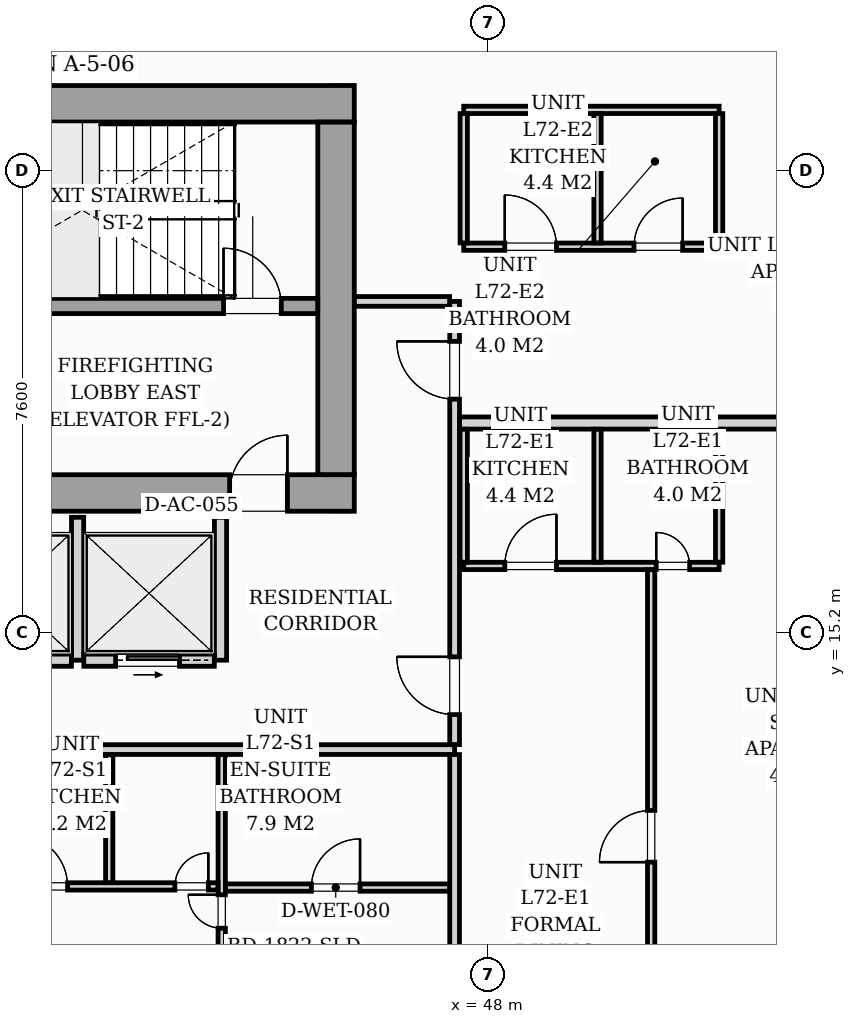
"""IFC4 building model, lengths in metres.
Left out: names, types, materials, properties, quantities, classifications, styles, units other than length and angle.
Written with IfcOpenShell. Run it as: python <this file> out.ifc"""

import sys

from ifc_helpers import new_model, si_unit, direction, frame, frame_2d, origin, origin_2d, place, context, subcontext, project, spatial, rectangle, i_section, extrude, source, transform, mapped, element, fill, save


model = new_model("IFC4")
c1 = context("Model", 3, precision=1e-05, world=origin(), true_north=direction((0.0, 1.0)))
c2 = subcontext(c1, "Body", "Model", "MODEL_VIEW")
j1 = project(units=[si_unit("LENGTHUNIT", "METRE"), si_unit("PLANEANGLEUNIT", "RADIAN")], contexts=[c1])
p1 = place(None, origin())
s1 = spatial("IfcSite", under=j1, at=p1, CompositionType="ELEMENT")
p2 = place(p1, origin())
s2 = spatial("IfcBuilding", under=s1, at=p2, CompositionType="ELEMENT")
p3 = place(p2, frame((0.0, 0.0, 249.6)))
s3 = spatial("IfcBuildingStorey", under=s2, at=p3, CompositionType="ELEMENT", Elevation=249.6)
m1 = source(origin(), c2, "Body", "SweptSolid", [
    extrude(i_section(OverallWidth=0.409, OverallDepth=0.425, WebThickness=0.033, FlangeThickness=0.052, FilletRadius=0.018, at=origin_2d()), origin(), (0.0, 0.0, 1.0), 3.296),
])
for number, where, z_axis, x_axis in (
    (1, (45.6, 17.4, 0.002), (0.0, 0.0, 1.0), (1.0, 0.0, 0.0)),
    (2, (45.6, 24.0, 0.002), (0.0, 0.0, 1.0), (1.0, 0.0, 0.0)),
):
    element("IfcColumn", number, at=place(p3, frame(where, z_axis=z_axis, x_axis=x_axis)), inside=s3, PredefinedType="PILASTER", context=c2, shape_type="MappedRepresentation", body=[
        mapped(m1, transform((0.0, 0.0, 0.0), scale=1.0)),
    ])
p4 = place(p3, frame((39.839, 26.166, 0.0), z_axis=(0.0, 0.0, 1.0), x_axis=(0.995884447498, -0.090632043071, 0.0)))
e3 = element("IfcWall", 3, at=p4, inside=s3, PredefinedType="STANDARD", context=c2, shape_type="SweptSolid", body=[
    extrude(rectangle(XDim=14.63, YDim=0.26, at=frame_2d((7.315, 0.0))), origin(), (0.0, 0.0, 1.0), 3.04),
])
p5 = place(p4, frame((7.57, 0.0, 0.0)))
e4 = element("IfcOpeningElement", 4, at=p5, cuts=e3, PredefinedType="OPENING", context=c2, shape_type="SweptSolid", body=[
    extrude(rectangle(XDim=1.8, YDim=2.06, at=frame_2d((0.9, 1.03))), frame((0.0, 0.14, 0.0), z_axis=(0.0, -1.0, 0.0), x_axis=(1.0, 0.0, 0.0)), (0.0, 0.0, 1.0), 0.28),
])
p6 = place(p4, frame((0.7, 0.0, 0.65)))
e5 = element("IfcOpeningElement", 5, at=p6, cuts=e3, PredefinedType="OPENING", context=c2, shape_type="SweptSolid", body=[
    extrude(rectangle(XDim=1.6, YDim=1.5, at=frame_2d((0.8, 0.75))), frame((0.0, 0.14, 0.0), z_axis=(0.0, -1.0, 0.0), x_axis=(1.0, 0.0, 0.0)), (0.0, 0.0, 1.0), 0.28),
])
p7 = place(p3, frame((26.2, 17.5, 0.0), z_axis=(0.0, 0.0, 1.0), x_axis=(1.0, 0.0, 0.0)))
e6 = element("IfcWall", 6, at=p7, inside=s3, PredefinedType="SHEAR", context=c2, shape_type="SweptSolid", body=[
    extrude(rectangle(XDim=19.6, YDim=0.6, at=frame_2d((9.8, 0.0))), origin(), (0.0, 0.0, 1.0), 3.3),
])
p8 = place(p7, frame((0.95, 0.0, 0.0)))
e7 = element("IfcOpeningElement", 7, at=p8, cuts=e6, PredefinedType="OPENING", context=c2, shape_type="SweptSolid", body=[
    extrude(rectangle(XDim=0.95, YDim=2.06, at=frame_2d((0.475, 1.03))), frame((0.0, 0.31, 0.0), z_axis=(0.0, -1.0, 0.0), x_axis=(1.0, 0.0, 0.0)), (0.0, 0.0, 1.0), 0.62),
])
p9 = place(p7, frame((9.38, 0.0, 0.0)))
e8 = element("IfcOpeningElement", 8, at=p9, cuts=e6, PredefinedType="OPENING", context=c2, shape_type="SweptSolid", body=[
    extrude(rectangle(XDim=0.85, YDim=2.0, at=frame_2d((0.425, 1.0))), frame((0.0, 0.31, 0.0), z_axis=(0.0, -1.0, 0.0), x_axis=(1.0, 0.0, 0.0)), (0.0, 0.0, 1.0), 0.62),
])
p10 = place(p7, frame((17.55, 0.0, 0.0)))
e9 = element("IfcOpeningElement", 9, at=p10, cuts=e6, PredefinedType="OPENING", context=c2, shape_type="SweptSolid", body=[
    extrude(rectangle(XDim=0.95, YDim=2.06, at=frame_2d((0.475, 1.03))), frame((0.0, 0.31, 0.0), z_axis=(0.0, -1.0, 0.0), x_axis=(1.0, 0.0, 0.0)), (0.0, 0.0, 1.0), 0.62),
])
p11 = place(p3, frame((26.2, 23.9, 0.0), z_axis=(0.0, 0.0, 1.0), x_axis=(1.0, 0.0, 0.0)))
e10 = element("IfcWall", 10, at=p11, inside=s3, PredefinedType="SHEAR", context=c2, shape_type="SweptSolid", body=[
    extrude(rectangle(XDim=19.6, YDim=0.6, at=frame_2d((9.8, 0.0))), origin(), (0.0, 0.0, 1.0), 3.3),
])
p12 = place(p3, frame((45.5, 17.802, 0.0), z_axis=(0.0, 0.0, 1.0), x_axis=(0.0, 1.0, 0.0)))
e11 = element("IfcWall", 11, at=p12, inside=s3, PredefinedType="SHEAR", context=c2, shape_type="SweptSolid", body=[
    extrude(rectangle(XDim=5.796, YDim=0.6, at=frame_2d((2.898, 0.0))), origin(), (0.0, 0.0, 1.0), 3.3),
])
p13 = place(p3, frame((37.05, 20.575, 0.0), z_axis=(0.0, 0.0, 1.0), x_axis=(1.0, 0.0, 0.0)))
e12 = element("IfcWall", 12, at=p13, inside=s3, PredefinedType="SOLIDWALL", context=c2, shape_type="SweptSolid", body=[
    extrude(rectangle(XDim=8.148, YDim=0.25, at=frame_2d((4.074, 0.0))), origin(), (0.0, 0.0, 1.0), 3.3),
])
p14 = place(p13, frame((6.6, 0.0, 0.0)))
e13 = element("IfcOpeningElement", 13, at=p14, cuts=e12, PredefinedType="OPENING", context=c2, shape_type="SweptSolid", body=[
    extrude(rectangle(XDim=0.95, YDim=2.06, at=frame_2d((0.475, 1.03))), frame((0.0, 0.135, 0.0), z_axis=(0.0, -1.0, 0.0), x_axis=(1.0, 0.0, 0.0)), (0.0, 0.0, 1.0), 0.27),
])
for number, where, z_axis, x_axis in (
    (14, (41.25, 14.75, 0.0), (0.0, 0.0, 1.0), (0.0, 1.0, 0.0)),
    (15, (43.6, 14.75, 0.0), (0.0, 0.0, 1.0), (0.0, 1.0, 0.0)),
):
    element("IfcWall", number, at=place(p3, frame(where, z_axis=z_axis, x_axis=x_axis)), inside=s3, PredefinedType="PARTITIONING", context=c2, shape_type="SweptSolid", body=[
        extrude(rectangle(XDim=2.35, YDim=0.2, at=frame_2d((1.175, 0.0))), origin(), (0.0, 0.0, 1.0), 3.04),
    ])
p15 = place(p3, frame((39.002, 14.75, 0.0), z_axis=(0.0, 0.0, 1.0), x_axis=(1.0, 0.0, 0.0)))
e16 = element("IfcWall", 16, at=p15, inside=s3, PredefinedType="PARTITIONING", context=c2, shape_type="SweptSolid", body=[
    extrude(rectangle(XDim=2.146, YDim=0.2, at=frame_2d((1.073, 0.0))), origin(), (0.0, 0.0, 1.0), 3.04),
])
p16 = place(p15, frame((0.523, 0.0, 0.0)))
e17 = element("IfcOpeningElement", 17, at=p16, cuts=e16, PredefinedType="OPENING", context=c2, shape_type="SweptSolid", body=[
    extrude(rectangle(XDim=1.05, YDim=2.08, at=frame_2d((0.525, 1.04))), frame((0.0, 0.11, 0.0), z_axis=(0.0, -1.0, 0.0), x_axis=(1.0, 0.0, 0.0)), (0.0, 0.0, 1.0), 0.22),
])
p17 = place(p3, frame((41.352, 14.75, 0.0), z_axis=(0.0, 0.0, 1.0), x_axis=(1.0, 0.0, 0.0)))
e18 = element("IfcWall", 18, at=p17, inside=s3, PredefinedType="PARTITIONING", context=c2, shape_type="SweptSolid", body=[
    extrude(rectangle(XDim=2.146, YDim=0.2, at=frame_2d((1.073, 0.0))), origin(), (0.0, 0.0, 1.0), 3.04),
])
p18 = place(p17, frame((0.523, 0.0, 0.0)))
e19 = element("IfcOpeningElement", 19, at=p18, cuts=e18, PredefinedType="OPENING", context=c2, shape_type="SweptSolid", body=[
    extrude(rectangle(XDim=1.05, YDim=2.08, at=frame_2d((0.525, 1.04))), frame((0.0, 0.11, 0.0), z_axis=(0.0, -1.0, 0.0), x_axis=(1.0, 0.0, 0.0)), (0.0, 0.0, 1.0), 0.22),
])
p19 = place(p3, frame((24.55, 13.28, 0.0), z_axis=(0.0, 0.0, 1.0), x_axis=(1.0, 0.0, 0.0)))
e20 = element("IfcWall", 20, at=p19, inside=s3, PredefinedType="PARTITIONING", context=c2, shape_type="SweptSolid", body=[
    extrude(rectangle(XDim=22.9, YDim=0.16, at=frame_2d((11.45, 0.0))), origin(), (0.0, 0.0, 1.0), 2.596),
])
p20 = place(p19, frame((7.125, 0.0, 0.0)))
e21 = element("IfcOpeningElement", 21, at=p20, cuts=e20, PredefinedType="OPENING", context=c2, shape_type="SweptSolid", body=[
    extrude(rectangle(XDim=0.95, YDim=2.06, at=frame_2d((0.475, 1.03))), frame((0.0, 0.09, 0.0), z_axis=(0.0, -1.0, 0.0), x_axis=(1.0, 0.0, 0.0)), (0.0, 0.0, 1.0), 0.18),
])
p21 = place(p3, frame((47.45, 7.993, 0.0), z_axis=(0.0, 0.0, 1.0), x_axis=(0.0, 1.0, 0.0)))
e22 = element("IfcWall", 22, at=p21, inside=s3, PredefinedType="PARTITIONING", context=c2, shape_type="SweptSolid", body=[
    extrude(rectangle(XDim=5.205, YDim=0.16, at=frame_2d((2.603, 0.0))), origin(), (0.0, 0.0, 1.0), 3.04),
])
p22 = place(p3, frame((47.45, 13.362, 0.0), z_axis=(0.0, 0.0, 1.0), x_axis=(0.0, 1.0, 0.0)))
e23 = element("IfcWall", 23, at=p22, inside=s3, PredefinedType="PARTITIONING", context=c2, shape_type="SweptSolid", body=[
    extrude(rectangle(XDim=7.288, YDim=0.16, at=frame_2d((3.644, 0.0))), origin(), (0.0, 0.0, 1.0), 3.04),
])
p23 = place(p22, frame((0.493, 0.0, 0.0)))
e24 = element("IfcOpeningElement", 24, at=p23, cuts=e23, PredefinedType="OPENING", context=c2, shape_type="SweptSolid", body=[
    extrude(rectangle(XDim=0.95, YDim=2.06, at=frame_2d((0.475, 1.03))), frame((0.0, 0.09, 0.0), z_axis=(0.0, -1.0, 0.0), x_axis=(1.0, 0.0, 0.0)), (0.0, 0.0, 1.0), 0.18),
])
p24 = place(p22, frame((5.681, 0.0, 0.0)))
e25 = element("IfcOpeningElement", 25, at=p24, cuts=e23, PredefinedType="OPENING", context=c2, shape_type="SweptSolid", body=[
    extrude(rectangle(XDim=0.95, YDim=2.06, at=frame_2d((0.475, 1.03))), frame((0.0, 0.09, 0.0), z_axis=(0.0, -1.0, 0.0), x_axis=(1.0, 0.0, 0.0)), (0.0, 0.0, 1.0), 0.18),
])
p25 = place(p3, frame((45.802, 20.65, 0.0), z_axis=(0.0, 0.0, 1.0), x_axis=(1.0, 0.0, 0.0)))
e26 = element("IfcWall", 26, at=p25, inside=s3, PredefinedType="PARTITIONING", context=c2, shape_type="SweptSolid", body=[
    extrude(rectangle(XDim=1.566, YDim=0.16, at=frame_2d((0.783, 0.0))), origin(), (0.0, 0.0, 1.0), 3.04),
])
p26 = place(p3, frame((43.62, 8.342, 0.0), z_axis=(0.0, 0.0, 1.0), x_axis=(0.0, 1.0, 0.0)))
e27 = element("IfcWall", 27, at=p26, inside=s3, PredefinedType="PARTITIONING", context=c2, shape_type="SweptSolid", body=[
    extrude(rectangle(XDim=4.856, YDim=0.12, at=frame_2d((2.428, 0.0))), origin(), (0.0, 0.0, 1.0), 3.04),
])
p27 = place(p26, frame((2.0, 0.0, 0.0)))
e28 = element("IfcOpeningElement", 28, at=p27, cuts=e27, PredefinedType="OPENING", context=c2, shape_type="SweptSolid", body=[
    extrude(rectangle(XDim=0.55, YDim=2.0, at=frame_2d((0.275, 1.0))), frame((0.0, 0.07, 0.0), z_axis=(0.0, -1.0, 0.0), x_axis=(1.0, 0.0, 0.0)), (0.0, 0.0, 1.0), 0.14),
])
p28 = place(p3, frame((39.67, 11.03, 0.0), z_axis=(0.0, 0.0, 1.0), x_axis=(1.0, 0.0, 0.0)))
e29 = element("IfcWall", 29, at=p28, inside=s3, PredefinedType="PARTITIONING", context=c2, shape_type="SweptSolid", body=[
    extrude(rectangle(XDim=3.888, YDim=0.12, at=frame_2d((1.944, 0.0))), origin(), (0.0, 0.0, 1.0), 3.04),
])
p29 = place(p28, frame((0.565, 0.0, 0.0)))
e30 = element("IfcOpeningElement", 30, at=p29, cuts=e29, PredefinedType="OPENING", context=c2, shape_type="SweptSolid", body=[
    extrude(rectangle(XDim=0.85, YDim=2.05, at=frame_2d((0.425, 1.025))), frame((0.0, 0.07, 0.0), z_axis=(0.0, -1.0, 0.0), x_axis=(1.0, 0.0, 0.0)), (0.0, 0.0, 1.0), 0.14),
])
p30 = place(p28, frame((3.18, 0.0, 0.0)))
e31 = element("IfcOpeningElement", 31, at=p30, cuts=e29, PredefinedType="OPENING", context=c2, shape_type="SweptSolid", body=[
    extrude(rectangle(XDim=0.55, YDim=2.0, at=frame_2d((0.275, 1.0))), frame((0.0, 0.07, 0.0), z_axis=(0.0, -1.0, 0.0), x_axis=(1.0, 0.0, 0.0)), (0.0, 0.0, 1.0), 0.14),
])
p31 = place(p3, frame((41.77, 11.092, 0.0), z_axis=(0.0, 0.0, 1.0), x_axis=(0.0, 1.0, 0.0)))
e32 = element("IfcWall", 32, at=p31, inside=s3, PredefinedType="PARTITIONING", context=c2, shape_type="SweptSolid", body=[
    extrude(rectangle(XDim=2.106, YDim=0.12, at=frame_2d((1.053, 0.0))), origin(), (0.0, 0.0, 1.0), 3.04),
])
p32 = place(p3, frame((43.682, 11.011, 0.0), z_axis=(0.0, 0.0, 1.0), x_axis=(1.0, 0.0, 0.0)))
e33 = element("IfcWall", 33, at=p32, inside=s3, PredefinedType="PARTITIONING", context=c2, shape_type="SweptSolid", body=[
    extrude(rectangle(XDim=3.686, YDim=0.12, at=frame_2d((1.843, 0.0))), origin(), (0.0, 0.0, 1.0), 3.04),
])
p33 = place(p32, frame((1.413, 0.0, 0.0)))
e34 = element("IfcOpeningElement", 34, at=p33, cuts=e33, PredefinedType="OPENING", context=c2, shape_type="SweptSolid", body=[
    extrude(rectangle(XDim=0.8, YDim=2.02, at=frame_2d((0.4, 1.01))), frame((0.0, 0.07, 0.0), z_axis=(0.0, -1.0, 0.0), x_axis=(1.0, 0.0, 0.0)), (0.0, 0.0, 1.0), 0.14),
])
p34 = place(p3, frame((47.532, 18.65, 0.0), z_axis=(0.0, 0.0, 1.0), x_axis=(1.0, 0.0, 0.0)))
e35 = element("IfcWall", 35, at=p34, inside=s3, PredefinedType="PARTITIONING", context=c2, shape_type="SweptSolid", body=[
    extrude(rectangle(XDim=8.743, YDim=0.2, at=frame_2d((4.372, 0.0))), origin(), (0.0, 0.0, 1.0), 3.04),
])
p35 = place(p3, frame((47.6, 16.3, 0.0), z_axis=(0.0, 0.0, 1.0), x_axis=(1.0, 0.0, 0.0)))
e36 = element("IfcWall", 36, at=p35, inside=s3, PredefinedType="PARTITIONING", context=c2, shape_type="SweptSolid", body=[
    extrude(rectangle(XDim=4.2, YDim=0.12, at=frame_2d((2.1, 0.0))), origin(), (0.0, 0.0, 1.0), 2.381),
])
p36 = place(p35, frame((0.675, 0.0, 0.0)))
e37 = element("IfcOpeningElement", 37, at=p36, cuts=e36, PredefinedType="OPENING", context=c2, shape_type="SweptSolid", body=[
    extrude(rectangle(XDim=0.85, YDim=2.05, at=frame_2d((0.425, 1.025))), frame((0.0, 0.07, 0.0), z_axis=(0.0, -1.0, 0.0), x_axis=(1.0, 0.0, 0.0)), (0.0, 0.0, 1.0), 0.14),
])
p37 = place(p35, frame((3.165, 0.0, 0.0)))
e38 = element("IfcOpeningElement", 38, at=p37, cuts=e36, PredefinedType="OPENING", context=c2, shape_type="SweptSolid", body=[
    extrude(rectangle(XDim=0.55, YDim=2.0, at=frame_2d((0.275, 1.0))), frame((0.0, 0.07, 0.0), z_axis=(0.0, -1.0, 0.0), x_axis=(1.0, 0.0, 0.0)), (0.0, 0.0, 1.0), 0.14),
])
for number, where, z_axis, x_axis in (
    (39, (47.6, 16.362, 0.0), (0.0, 0.0, 1.0), (0.0, 1.0, 0.0)),
    (40, (49.8, 16.362, 0.0), (0.0, 0.0, 1.0), (0.0, 1.0, 0.0)),
    (41, (51.8, 16.362, 0.0), (0.0, 0.0, 1.0), (0.0, 1.0, 0.0)),
):
    element("IfcWall", number, at=place(p3, frame(where, z_axis=z_axis, x_axis=x_axis)), inside=s3, PredefinedType="PARTITIONING", context=c2, shape_type="SweptSolid", body=[
        extrude(rectangle(XDim=2.186, YDim=0.12, at=frame_2d((1.093, 0.0))), origin(), (0.0, 0.0, 1.0), 3.04),
    ])
p38 = place(p3, frame((50.682, 7.699, 0.0), z_axis=(0.0, 0.0, 1.0), x_axis=(0.0, 1.0, 0.0)))
e42 = element("IfcWall", 42, at=p38, inside=s3, PredefinedType="PARTITIONING", context=c2, shape_type="SweptSolid", body=[
    extrude(rectangle(XDim=8.539, YDim=0.12, at=frame_2d((4.27, 0.0))), origin(), (0.0, 0.0, 1.0), 3.04),
])
p39 = place(p38, frame((3.73, 0.0, 0.0)))
e43 = element("IfcOpeningElement", 43, at=p39, cuts=e42, PredefinedType="OPENING", context=c2, shape_type="SweptSolid", body=[
    extrude(rectangle(XDim=0.85, YDim=2.05, at=frame_2d((0.425, 1.025))), frame((0.0, 0.07, 0.0), z_axis=(0.0, -1.0, 0.0), x_axis=(1.0, 0.0, 0.0)), (0.0, 0.0, 1.0), 0.14),
])
p40 = place(p3, frame((47.6, 21.55, 0.0), z_axis=(0.0, 0.0, 1.0), x_axis=(1.0, 0.0, 0.0)))
e44 = element("IfcWall", 44, at=p40, inside=s3, PredefinedType="PARTITIONING", context=c2, shape_type="SweptSolid", body=[
    extrude(rectangle(XDim=4.2, YDim=0.12, at=frame_2d((2.1, 0.0))), origin(), (0.0, 0.0, 1.0), 3.04),
])
p41 = place(p40, frame((0.675, 0.0, 0.0)))
e45 = element("IfcOpeningElement", 45, at=p41, cuts=e44, PredefinedType="OPENING", context=c2, shape_type="SweptSolid", body=[
    extrude(rectangle(XDim=0.85, YDim=2.05, at=frame_2d((0.425, 1.025))), frame((0.0, 0.07, 0.0), z_axis=(0.0, -1.0, 0.0), x_axis=(1.0, 0.0, 0.0)), (0.0, 0.0, 1.0), 0.14),
])
p42 = place(p40, frame((2.8, 0.0, 0.0)))
e46 = element("IfcOpeningElement", 46, at=p42, cuts=e44, PredefinedType="OPENING", context=c2, shape_type="SweptSolid", body=[
    extrude(rectangle(XDim=0.8, YDim=2.02, at=frame_2d((0.4, 1.01))), frame((0.0, 0.07, 0.0), z_axis=(0.0, -1.0, 0.0), x_axis=(1.0, 0.0, 0.0)), (0.0, 0.0, 1.0), 0.14),
])
p43 = place(p3, frame((47.6, 23.8, 0.0), z_axis=(0.0, 0.0, 1.0), x_axis=(1.0, 0.0, 0.0)))
e47 = element("IfcWall", 47, at=p43, inside=s3, PredefinedType="PARTITIONING", context=c2, shape_type="SweptSolid", body=[
    extrude(rectangle(XDim=4.2, YDim=0.12, at=frame_2d((2.1, 0.0))), origin(), (0.0, 0.0, 1.0), 3.04),
])
for number, where, z_axis, x_axis in (
    (48, (47.6, 21.612, 0.0), (0.0, 0.0, 1.0), (0.0, 1.0, 0.0)),
    (49, (49.8, 21.612, 0.0), (0.0, 0.0, 1.0), (0.0, 1.0, 0.0)),
    (50, (51.8, 21.612, 0.0), (0.0, 0.0, 1.0), (0.0, 1.0, 0.0)),
):
    element("IfcWall", number, at=place(p3, frame(where, z_axis=z_axis, x_axis=x_axis)), inside=s3, PredefinedType="PARTITIONING", context=c2, shape_type="SweptSolid", body=[
        extrude(rectangle(XDim=2.126, YDim=0.12, at=frame_2d((1.063, 0.0))), origin(), (0.0, 0.0, 1.0), 3.04),
    ])
m2 = source(origin(), c2, "Body", "SweptSolid", [
    extrude(rectangle(XDim=0.95, YDim=2.06, at=frame_2d((0.475, 1.03))), frame((0.0, 0.025, 0.0), z_axis=(0.0, -1.0, 0.0), x_axis=(1.0, 0.0, 0.0)), (0.0, 0.0, 1.0), 0.05),
])
p44 = place(p10, origin())
e51 = element("IfcDoor", 51, at=p44, inside=s3, OperationType="SINGLE_SWING_RIGHT", PredefinedType="DOOR", context=c2, shape_type="MappedRepresentation", body=[
    mapped(m2, transform((0.0, 0.0, 0.0), scale=1.0)),
])
fill(e9, e51)
p45 = place(p14, origin())
e52 = element("IfcDoor", 52, at=p45, inside=s3, OperationType="SINGLE_SWING_LEFT", PredefinedType="DOOR", context=c2, shape_type="MappedRepresentation", body=[
    mapped(m2, transform((0.0, 0.0, 0.0), scale=1.0)),
])
fill(e13, e52)
m3 = source(origin(), c2, "Body", "SweptSolid", [
    extrude(rectangle(XDim=1.05, YDim=2.08, at=frame_2d((0.525, 1.04))), frame((0.0, 0.025, 0.0), z_axis=(0.0, -1.0, 0.0), x_axis=(1.0, 0.0, 0.0)), (0.0, 0.0, 1.0), 0.05),
])
p46 = place(p18, origin())
e53 = element("IfcDoor", 53, at=p46, inside=s3, OperationType="SLIDING_TO_RIGHT", PredefinedType="DOOR", context=c2, shape_type="MappedRepresentation", body=[
    mapped(m3, transform((0.0, 0.0, 0.0), scale=1.0)),
])
fill(e19, e53)
m4 = source(origin(), c2, "Body", "SweptSolid", [
    extrude(rectangle(XDim=0.8, YDim=2.02, at=frame_2d((0.4, 1.01))), frame((0.0, 0.025, 0.0), z_axis=(0.0, -1.0, 0.0), x_axis=(1.0, 0.0, 0.0)), (0.0, 0.0, 1.0), 0.05),
])
p47 = place(p33, origin())
e54 = element("IfcDoor", 54, at=p47, inside=s3, OperationType="SINGLE_SWING_RIGHT", PredefinedType="DOOR", context=c2, shape_type="MappedRepresentation", body=[
    mapped(m4, transform((0.0, 0.0, 0.0), scale=1.0)),
])
fill(e34, e54)
m5 = source(origin(), c2, "Body", "SweptSolid", [
    extrude(rectangle(XDim=0.55, YDim=2.0, at=frame_2d((0.275, 1.0))), frame((0.0, 0.025, 0.0), z_axis=(0.0, -1.0, 0.0), x_axis=(1.0, 0.0, 0.0)), (0.0, 0.0, 1.0), 0.05),
])
p48 = place(p27, origin())
e55 = element("IfcDoor", 55, at=p48, inside=s3, OperationType="SINGLE_SWING_RIGHT", PredefinedType="DOOR", context=c2, shape_type="MappedRepresentation", body=[
    mapped(m5, transform((0.0, 0.0, 0.0), scale=1.0)),
])
fill(e28, e55)
m6 = source(origin(), c2, "Body", "SweptSolid", [
    extrude(rectangle(XDim=0.85, YDim=2.05, at=frame_2d((0.425, 1.025))), frame((0.0, 0.025, 0.0), z_axis=(0.0, -1.0, 0.0), x_axis=(1.0, 0.0, 0.0)), (0.0, 0.0, 1.0), 0.05),
])
p49 = place(p29, origin())
e56 = element("IfcDoor", 56, at=p49, inside=s3, OperationType="SINGLE_SWING_LEFT", PredefinedType="DOOR", context=c2, shape_type="MappedRepresentation", body=[
    mapped(m6, transform((0.0, 0.0, 0.0), scale=1.0)),
])
fill(e30, e56)
p50 = place(p30, origin())
e57 = element("IfcDoor", 57, at=p50, inside=s3, OperationType="SINGLE_SWING_RIGHT", PredefinedType="DOOR", context=c2, shape_type="MappedRepresentation", body=[
    mapped(m5, transform((0.0, 0.0, 0.0), scale=1.0)),
])
fill(e31, e57)
m7 = source(origin(), c2, "Body", "SweptSolid", [
    extrude(rectangle(XDim=0.95, YDim=2.06, at=frame_2d((0.475, 1.03))), frame((0.0, 0.025, 0.0), z_axis=(0.0, -1.0, 0.0), x_axis=(1.0, 0.0, 0.0)), (0.0, 0.0, 1.0), 0.05),
])
p51 = place(p23, origin())
e58 = element("IfcDoor", 58, at=p51, inside=s3, OperationType="SINGLE_SWING_RIGHT", PredefinedType="DOOR", context=c2, shape_type="MappedRepresentation", body=[
    mapped(m7, transform((0.0, 0.0, 0.0), scale=1.0)),
])
fill(e24, e58)
p52 = place(p39, origin())
e59 = element("IfcDoor", 59, at=p52, inside=s3, OperationType="SINGLE_SWING_LEFT", PredefinedType="DOOR", context=c2, shape_type="MappedRepresentation", body=[
    mapped(m6, transform((0.0, 0.0, 0.0), scale=1.0)),
])
fill(e43, e59)
p53 = place(p36, origin())
e60 = element("IfcDoor", 60, at=p53, inside=s3, OperationType="SINGLE_SWING_RIGHT", PredefinedType="DOOR", context=c2, shape_type="MappedRepresentation", body=[
    mapped(m6, transform((0.0, 0.0, 0.0), scale=1.0)),
])
fill(e37, e60)
p54 = place(p37, origin())
e61 = element("IfcDoor", 61, at=p54, inside=s3, OperationType="SINGLE_SWING_LEFT", PredefinedType="DOOR", context=c2, shape_type="MappedRepresentation", body=[
    mapped(m5, transform((0.0, 0.0, 0.0), scale=1.0)),
])
fill(e38, e61)
p55 = place(p24, origin())
e62 = element("IfcDoor", 62, at=p55, inside=s3, OperationType="SINGLE_SWING_RIGHT", PredefinedType="DOOR", context=c2, shape_type="MappedRepresentation", body=[
    mapped(m7, transform((0.0, 0.0, 0.0), scale=1.0)),
])
fill(e25, e62)
p56 = place(p41, origin())
e63 = element("IfcDoor", 63, at=p56, inside=s3, OperationType="SINGLE_SWING_LEFT", PredefinedType="DOOR", context=c2, shape_type="MappedRepresentation", body=[
    mapped(m6, transform((0.0, 0.0, 0.0), scale=1.0)),
])
fill(e45, e63)
p57 = place(p42, origin())
e64 = element("IfcDoor", 64, at=p57, inside=s3, OperationType="SINGLE_SWING_RIGHT", PredefinedType="DOOR", context=c2, shape_type="MappedRepresentation", body=[
    mapped(m4, transform((0.0, 0.0, 0.0), scale=1.0)),
])
fill(e46, e64)
save(model, sys.argv[1])
